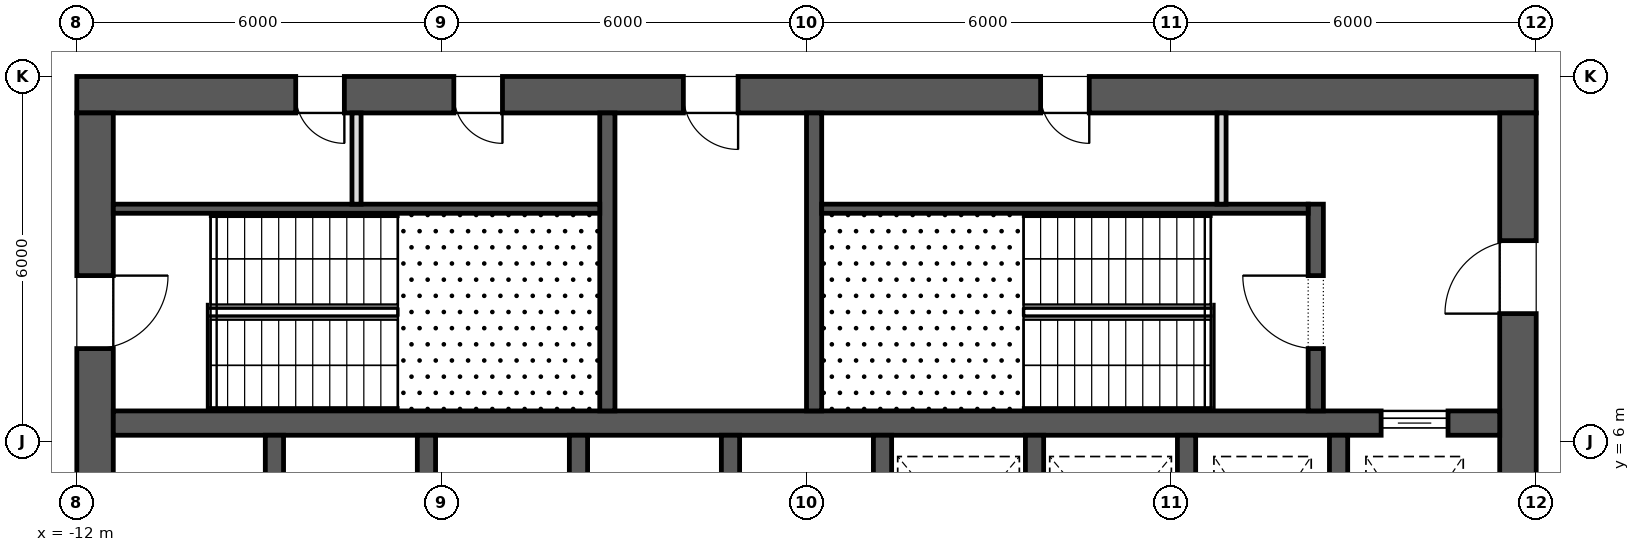
"""IFC4 building model, lengths in metres.
Left out: names, types, materials, properties, quantities, classifications, styles, units other than length and angle.
Written with IfcOpenShell. Run it as: python <this file> out.ifc"""

import sys

from ifc_helpers import new_model, si_unit, direction, frame, frame_2d, origin, place, context, subcontext, project, spatial, rectangle, extrude, element, fill, save


model = new_model("IFC4")
c1 = context("Model", 3, precision=1e-05, world=origin(), true_north=direction((0.0, 1.0)))
c2 = subcontext(c1, "Body", "Model", "MODEL_VIEW")
j1 = project(units=[si_unit("LENGTHUNIT", "METRE"), si_unit("PLANEANGLEUNIT", "RADIAN")], contexts=[c1])
p1 = place(None, origin())
s1 = spatial("IfcSite", under=j1, at=p1, CompositionType="ELEMENT")
p2 = place(p1, origin())
s2 = spatial("IfcBuilding", under=s1, at=p2, CompositionType="ELEMENT")
p3 = place(p2, frame((0.0, 0.0, 154.9)))
s3 = spatial("IfcBuildingStorey", under=s2, at=p3, CompositionType="ELEMENT", Elevation=154.9)
p4 = place(p3, frame((-12.0, 11.7, 0.0), z_axis=(0.0, 0.0, 1.0), x_axis=(1.0, 0.0, 0.0)))
e1 = element("IfcWall", 1, at=p4, inside=s3, PredefinedType="SHEAR", context=c2, shape_type="SweptSolid", body=[
    extrude(rectangle(XDim=24.0, YDim=0.6, at=frame_2d((12.0, 0.0))), origin(), (0.0, 0.0, 1.0), 4.2),
])
p5 = place(p4, frame((9.975, 0.0, 0.0)))
e2 = element("IfcOpeningElement", 2, at=p5, cuts=e1, PredefinedType="OPENING", context=c2, shape_type="SweptSolid", body=[
    extrude(rectangle(XDim=0.9, YDim=2.1, at=frame_2d((0.45, 1.05))), frame((0.0, 0.312, 0.0), z_axis=(0.0, -1.0, 0.0), x_axis=(1.0, 0.0, 0.0)), (0.0, 0.0, 1.0), 0.624),
])
p6 = place(p4, frame((3.6, 0.0, 0.0)))
e3 = element("IfcOpeningElement", 3, at=p6, cuts=e1, PredefinedType="OPENING", context=c2, shape_type="SweptSolid", body=[
    extrude(rectangle(XDim=0.8, YDim=2.1, at=frame_2d((0.4, 1.05))), frame((0.0, 0.312, 0.0), z_axis=(0.0, -1.0, 0.0), x_axis=(1.0, 0.0, 0.0)), (0.0, 0.0, 1.0), 0.624),
])
p7 = place(p4, frame((6.2, 0.0, 0.0)))
e4 = element("IfcOpeningElement", 4, at=p7, cuts=e1, PredefinedType="OPENING", context=c2, shape_type="SweptSolid", body=[
    extrude(rectangle(XDim=0.8, YDim=2.1, at=frame_2d((0.4, 1.05))), frame((0.0, 0.312, 0.0), z_axis=(0.0, -1.0, 0.0), x_axis=(1.0, 0.0, 0.0)), (0.0, 0.0, 1.0), 0.624),
])
p8 = place(p4, frame((15.85, 0.0, 0.0)))
e5 = element("IfcOpeningElement", 5, at=p8, cuts=e1, PredefinedType="OPENING", context=c2, shape_type="SweptSolid", body=[
    extrude(rectangle(XDim=0.8, YDim=2.1, at=frame_2d((0.4, 1.05))), frame((0.0, 0.312, 0.0), z_axis=(0.0, -1.0, 0.0), x_axis=(1.0, 0.0, 0.0)), (0.0, 0.0, 1.0), 0.624),
])
p9 = place(p3, frame((11.7, -11.4, 0.0), z_axis=(0.0, 0.0, 1.0), x_axis=(0.0, 1.0, 0.0)))
e6 = element("IfcWall", 6, at=p9, inside=s3, PredefinedType="SHEAR", context=c2, shape_type="SweptSolid", body=[
    extrude(rectangle(XDim=22.8, YDim=0.6, at=frame_2d((11.4, 0.0))), origin(), (0.0, 0.0, 1.0), 4.2),
])
p10 = place(p9, frame((10.2, 0.0, 0.0)))
e7 = element("IfcOpeningElement", 7, at=p10, cuts=e6, PredefinedType="OPENING", context=c2, shape_type="SweptSolid", body=[
    extrude(rectangle(XDim=2.4, YDim=2.1, at=frame_2d((1.2, 1.05))), frame((0.0, 0.312, 0.0), z_axis=(0.0, -1.0, 0.0), x_axis=(1.0, 0.0, 0.0)), (0.0, 0.0, 1.0), 0.624),
])
p11 = place(p9, frame((19.5, 0.0, 0.0)))
e8 = element("IfcOpeningElement", 8, at=p11, cuts=e6, PredefinedType="OPENING", context=c2, shape_type="SweptSolid", body=[
    extrude(rectangle(XDim=1.2, YDim=2.1, at=frame_2d((0.6, 1.05))), frame((0.0, 0.312, 0.0), z_axis=(0.0, -1.0, 0.0), x_axis=(1.0, 0.0, 0.0)), (0.0, 0.0, 1.0), 0.624),
])
p12 = place(p9, frame((2.1, 0.0, 0.0)))
e9 = element("IfcOpeningElement", 9, at=p12, cuts=e6, PredefinedType="OPENING", context=c2, shape_type="SweptSolid", body=[
    extrude(rectangle(XDim=1.2, YDim=2.1, at=frame_2d((0.6, 1.05))), frame((0.0, 0.312, 0.0), z_axis=(0.0, -1.0, 0.0), x_axis=(1.0, 0.0, 0.0)), (0.0, 0.0, 1.0), 0.624),
])
p13 = place(p3, frame((-11.7, -11.4, 0.0), z_axis=(0.0, 0.0, 1.0), x_axis=(0.0, 1.0, 0.0)))
e10 = element("IfcWall", 10, at=p13, inside=s3, PredefinedType="SHEAR", context=c2, shape_type="SweptSolid", body=[
    extrude(rectangle(XDim=22.8, YDim=0.6, at=frame_2d((11.4, 0.0))), origin(), (0.0, 0.0, 1.0), 4.2),
])
p14 = place(p13, frame((10.2, 0.0, 0.0)))
e11 = element("IfcOpeningElement", 11, at=p14, cuts=e10, PredefinedType="OPENING", context=c2, shape_type="SweptSolid", body=[
    extrude(rectangle(XDim=2.4, YDim=2.1, at=frame_2d((1.2, 1.05))), frame((0.0, 0.312, 0.0), z_axis=(0.0, -1.0, 0.0), x_axis=(1.0, 0.0, 0.0)), (0.0, 0.0, 1.0), 0.624),
])
p15 = place(p13, frame((18.925, 0.0, 0.0)))
e12 = element("IfcOpeningElement", 12, at=p15, cuts=e10, PredefinedType="OPENING", context=c2, shape_type="SweptSolid", body=[
    extrude(rectangle(XDim=1.2, YDim=2.1, at=frame_2d((0.6, 1.05))), frame((0.0, 0.312, 0.0), z_axis=(0.0, -1.0, 0.0), x_axis=(1.0, 0.0, 0.0)), (0.0, 0.0, 1.0), 0.624),
])
p16 = place(p13, frame((2.675, 0.0, 0.0)))
e13 = element("IfcOpeningElement", 13, at=p16, cuts=e10, PredefinedType="OPENING", context=c2, shape_type="SweptSolid", body=[
    extrude(rectangle(XDim=1.2, YDim=2.1, at=frame_2d((0.6, 1.05))), frame((0.0, 0.312, 0.0), z_axis=(0.0, -1.0, 0.0), x_axis=(1.0, 0.0, 0.0)), (0.0, 0.0, 1.0), 0.624),
])
p17 = place(p3, frame((-11.4, 6.3, 0.0), z_axis=(0.0, 0.0, 1.0), x_axis=(1.0, 0.0, 0.0)))
e14 = element("IfcWall", 14, at=p17, inside=s3, PredefinedType="SHEAR", context=c2, shape_type="SweptSolid", body=[
    extrude(rectangle(XDim=22.8, YDim=0.4, at=frame_2d((11.4, 0.0))), origin(), (0.0, 0.0, 1.0), 4.2),
])
p18 = place(p17, frame((20.85, 0.0, 0.0)))
e15 = element("IfcOpeningElement", 15, at=p18, cuts=e14, PredefinedType="OPENING", context=c2, shape_type="SweptSolid", body=[
    extrude(rectangle(XDim=1.1, YDim=2.1, at=frame_2d((0.55, 1.05))), frame((0.0, 0.212, 0.0), z_axis=(0.0, -1.0, 0.0), x_axis=(1.0, 0.0, 0.0)), (0.0, 0.0, 1.0), 0.424),
])
for number, where, z_axis, x_axis in (
    (16, (-8.75, 3.2, 0.0), (0.0, 0.0, 1.0), (0.0, 1.0, 0.0)),
    (17, (-6.25, 3.2, 0.0), (0.0, 0.0, 1.0), (0.0, 1.0, 0.0)),
    (18, (-3.75, 3.2, 0.0), (0.0, 0.0, 1.0), (0.0, 1.0, 0.0)),
    (19, (-1.25, 3.2, 0.0), (0.0, 0.0, 1.0), (0.0, 1.0, 0.0)),
    (20, (1.25, 3.2, 0.0), (0.0, 0.0, 1.0), (0.0, 1.0, 0.0)),
    (21, (3.75, 3.2, 0.0), (0.0, 0.0, 1.0), (0.0, 1.0, 0.0)),
    (22, (6.25, 3.2, 0.0), (0.0, 0.0, 1.0), (0.0, 1.0, 0.0)),
    (23, (8.75, 3.2, 0.0), (0.0, 0.0, 1.0), (0.0, 1.0, 0.0)),
):
    element("IfcWall", number, at=place(p3, frame(where, z_axis=z_axis, x_axis=x_axis)), inside=s3, PredefinedType="SHEAR", context=c2, shape_type="SweptSolid", body=[
        extrude(rectangle(XDim=2.9, YDim=0.3, at=frame_2d((1.45, 0.0))), origin(), (0.0, 0.0, 1.0), 4.2),
    ])
for number, where, z_axis, x_axis in (
    (24, (-3.275, 6.5, 0.0), (0.0, 0.0, 1.0), (0.0, 1.0, 0.0)),
    (25, (0.125, 6.5, 0.0), (0.0, 0.0, 1.0), (0.0, 1.0, 0.0)),
):
    element("IfcWall", number, at=place(p3, frame(where, z_axis=z_axis, x_axis=x_axis)), inside=s3, PredefinedType="SHEAR", context=c2, shape_type="SweptSolid", body=[
        extrude(rectangle(XDim=4.9, YDim=0.25, at=frame_2d((2.45, 0.0))), origin(), (0.0, 0.0, 1.0), 3.9),
    ])
p19 = place(p3, frame((8.375, 6.5, 0.0), z_axis=(0.0, 0.0, 1.0), x_axis=(0.0, 1.0, 0.0)))
e26 = element("IfcWall", 26, at=p19, inside=s3, PredefinedType="SHEAR", context=c2, shape_type="SweptSolid", body=[
    extrude(rectangle(XDim=3.4, YDim=0.25, at=frame_2d((1.7, 0.0))), origin(), (0.0, 0.0, 1.0), 3.9),
])
p20 = place(p19, frame((1.025, 0.0, 0.0)))
e27 = element("IfcOpeningElement", 27, at=p20, cuts=e26, PredefinedType="OPENING", context=c2, shape_type="SweptSolid", body=[
    extrude(rectangle(XDim=1.2, YDim=2.1, at=frame_2d((0.6, 1.05))), frame((0.0, 0.137, 0.0), z_axis=(0.0, -1.0, 0.0), x_axis=(1.0, 0.0, 0.0)), (0.0, 0.0, 1.0), 0.274),
])
for number, where, z_axis, x_axis in (
    (28, (-11.4, 9.825, 0.0), (0.0, 0.0, 1.0), (1.0, 0.0, 0.0)),
    (29, (0.25, 9.825, 0.0), (0.0, 0.0, 1.0), (1.0, 0.0, 0.0)),
):
    element("IfcWall", number, at=place(p3, frame(where, z_axis=z_axis, x_axis=x_axis)), inside=s3, PredefinedType="SHEAR", context=c2, shape_type="SweptSolid", body=[
        extrude(rectangle(XDim=8.0, YDim=0.15, at=frame_2d((4.0, 0.0))), origin(), (0.0, 0.0, 1.0), 3.9),
    ])
for number, where, z_axis, x_axis in (
    (30, (-7.4, 9.9, 0.0), (0.0, 0.0, 1.0), (0.0, 1.0, 0.0)),
    (31, (6.825, 9.9, 0.0), (0.0, 0.0, 1.0), (0.0, 1.0, 0.0)),
):
    element("IfcWall", number, at=place(p3, frame(where, z_axis=z_axis, x_axis=x_axis)), inside=s3, PredefinedType="PARTITIONING", context=c2, shape_type="SweptSolid", body=[
        extrude(rectangle(XDim=1.5, YDim=0.15, at=frame_2d((0.75, 0.0))), origin(), (0.0, 0.0, 1.0), 3.9),
    ])
p21 = place(p18, origin())
e32 = element("IfcDoor", 32, at=p21, inside=s3, OperationType="SLIDING_TO_LEFT", PredefinedType="DOOR", context=c2, shape_type="SweptSolid", body=[
    extrude(rectangle(XDim=1.1, YDim=2.1, at=frame_2d((0.55, 1.05))), frame((0.0, 0.025, 0.0), z_axis=(0.0, -1.0, 0.0), x_axis=(1.0, 0.0, 0.0)), (0.0, 0.0, 1.0), 0.05),
])
fill(e15, e32)
p22 = place(p15, frame((1.2, 0.0, 0.0), z_axis=(0.0, 0.0, 1.0), x_axis=(-1.0, 0.0, 0.0)))
e33 = element("IfcDoor", 33, at=p22, inside=s3, OperationType="SINGLE_SWING_RIGHT", PredefinedType="DOOR", context=c2, shape_type="SweptSolid", body=[
    extrude(rectangle(XDim=1.2, YDim=2.1, at=frame_2d((0.6, 1.05))), frame((0.0, 0.025, 0.0), z_axis=(0.0, -1.0, 0.0), x_axis=(1.0, 0.0, 0.0)), (0.0, 0.0, 1.0), 0.05),
])
fill(e12, e33)
p23 = place(p20, origin())
e34 = element("IfcDoor", 34, at=p23, inside=s3, OperationType="SINGLE_SWING_LEFT", PredefinedType="DOOR", context=c2, shape_type="SweptSolid", body=[
    extrude(rectangle(XDim=1.2, YDim=2.1, at=frame_2d((0.6, 1.05))), frame((0.0, 0.025, 0.0), z_axis=(0.0, -1.0, 0.0), x_axis=(1.0, 0.0, 0.0)), (0.0, 0.0, 1.0), 0.05),
])
fill(e27, e34)
p24 = place(p11, origin())
e35 = element("IfcDoor", 35, at=p24, inside=s3, OperationType="SINGLE_SWING_RIGHT", PredefinedType="DOOR", context=c2, shape_type="SweptSolid", body=[
    extrude(rectangle(XDim=1.2, YDim=2.1, at=frame_2d((0.6, 1.05))), frame((0.0, 0.025, 0.0), z_axis=(0.0, -1.0, 0.0), x_axis=(1.0, 0.0, 0.0)), (0.0, 0.0, 1.0), 0.05),
])
fill(e8, e35)
p25 = place(p5, frame((0.9, 0.0, 0.0), z_axis=(0.0, 0.0, 1.0), x_axis=(-1.0, 0.0, 0.0)))
e36 = element("IfcDoor", 36, at=p25, inside=s3, OperationType="SINGLE_SWING_RIGHT", PredefinedType="DOOR", context=c2, shape_type="SweptSolid", body=[
    extrude(rectangle(XDim=0.9, YDim=2.1, at=frame_2d((0.45, 1.05))), frame((0.0, 0.025, 0.0), z_axis=(0.0, -1.0, 0.0), x_axis=(1.0, 0.0, 0.0)), (0.0, 0.0, 1.0), 0.05),
])
fill(e2, e36)
p26 = place(p6, frame((0.8, 0.0, 0.0), z_axis=(0.0, 0.0, 1.0), x_axis=(-1.0, 0.0, 0.0)))
e37 = element("IfcDoor", 37, at=p26, inside=s3, OperationType="SINGLE_SWING_RIGHT", PredefinedType="DOOR", context=c2, shape_type="SweptSolid", body=[
    extrude(rectangle(XDim=0.8, YDim=2.1, at=frame_2d((0.4, 1.05))), frame((0.0, 0.025, 0.0), z_axis=(0.0, -1.0, 0.0), x_axis=(1.0, 0.0, 0.0)), (0.0, 0.0, 1.0), 0.05),
])
fill(e3, e37)
p27 = place(p7, frame((0.8, 0.0, 0.0), z_axis=(0.0, 0.0, 1.0), x_axis=(-1.0, 0.0, 0.0)))
e38 = element("IfcDoor", 38, at=p27, inside=s3, OperationType="SINGLE_SWING_RIGHT", PredefinedType="DOOR", context=c2, shape_type="SweptSolid", body=[
    extrude(rectangle(XDim=0.8, YDim=2.1, at=frame_2d((0.4, 1.05))), frame((0.0, 0.025, 0.0), z_axis=(0.0, -1.0, 0.0), x_axis=(1.0, 0.0, 0.0)), (0.0, 0.0, 1.0), 0.05),
])
fill(e4, e38)
p28 = place(p8, frame((0.8, 0.0, 0.0), z_axis=(0.0, 0.0, 1.0), x_axis=(-1.0, 0.0, 0.0)))
e39 = element("IfcDoor", 39, at=p28, inside=s3, OperationType="SINGLE_SWING_RIGHT", PredefinedType="DOOR", context=c2, shape_type="SweptSolid", body=[
    extrude(rectangle(XDim=0.8, YDim=2.1, at=frame_2d((0.4, 1.05))), frame((0.0, 0.025, 0.0), z_axis=(0.0, -1.0, 0.0), x_axis=(1.0, 0.0, 0.0)), (0.0, 0.0, 1.0), 0.05),
])
fill(e5, e39)
save(model, sys.argv[1])
